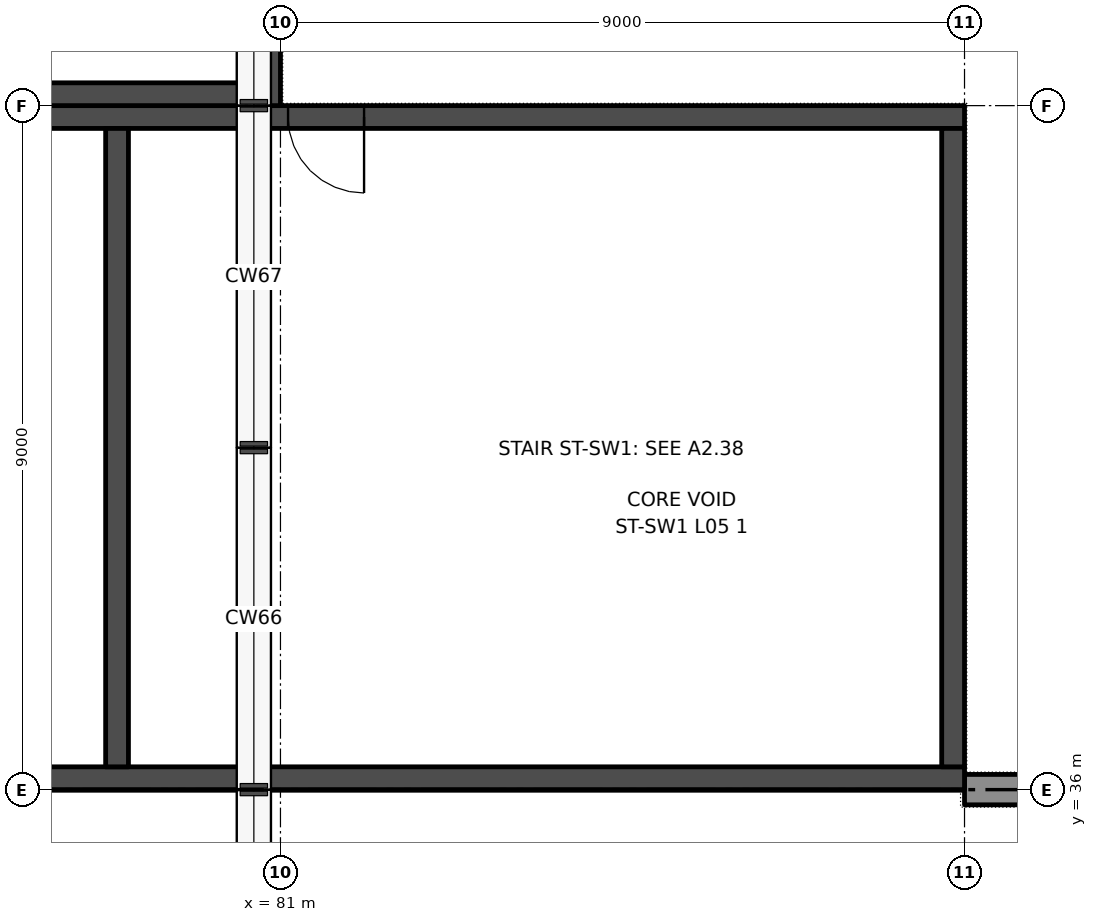
"""IFC4 building model, lengths in metres.
Left out: names, types, materials, properties, quantities, classifications, styles, units other than length and angle.
Written with IfcOpenShell. Run it as: python <this file> out.ifc"""

import sys

from ifc_helpers import new_model, si_unit, direction, frame, frame_2d, origin, place, context, subcontext, project, spatial, rectangle, extrude, element, fill, save


model = new_model("IFC4")
c1 = context("Model", 3, precision=1e-05, world=origin(), true_north=direction((0.0, 1.0)))
c2 = subcontext(c1, "Body", "Model", "MODEL_VIEW")
j1 = project(units=[si_unit("LENGTHUNIT", "METRE"), si_unit("PLANEANGLEUNIT", "RADIAN")], contexts=[c1])
p1 = place(None, origin())
s1 = spatial("IfcSite", under=j1, at=p1, CompositionType="ELEMENT")
p2 = place(p1, origin())
s2 = spatial("IfcBuilding", under=s1, at=p2, CompositionType="ELEMENT")
p3 = place(p2, frame((0.0, 0.0, 33.5)))
s3 = spatial("IfcBuildingStorey", under=s2, at=p3, CompositionType="ELEMENT", Elevation=33.5)
p4 = place(p3, frame((90.0, 36.0, 0.0), z_axis=(0.0, 0.0, 1.0), x_axis=(1.0, 0.0, 0.0)))
e1 = element("IfcWall", 1, at=p4, inside=s3, PredefinedType="SOLIDWALL", context=c2, shape_type="SweptSolid", body=[
    extrude(rectangle(XDim=81.0, YDim=0.4, at=frame_2d((40.5, 0.0))), origin(), (0.0, 0.0, 1.0), 4.0),
])
p5 = place(p4, frame((3.9, 0.0, 0.0)))
e2 = element("IfcOpeningElement", 2, at=p5, cuts=e1, PredefinedType="OPENING", context=c2, shape_type="SweptSolid", body=[
    extrude(rectangle(XDim=1.2, YDim=2.1, at=frame_2d((0.6, 1.05))), frame((0.0, 0.21, 0.0), z_axis=(0.0, -1.0, 0.0), x_axis=(1.0, 0.0, 0.0)), (0.0, 0.0, 1.0), 0.42),
])
p6 = place(p4, frame((75.9, 0.0, 0.0)))
e3 = element("IfcOpeningElement", 3, at=p6, cuts=e1, PredefinedType="OPENING", context=c2, shape_type="SweptSolid", body=[
    extrude(rectangle(XDim=1.2, YDim=2.1, at=frame_2d((0.6, 1.05))), frame((0.0, 0.21, 0.0), z_axis=(0.0, -1.0, 0.0), x_axis=(1.0, 0.0, 0.0)), (0.0, 0.0, 1.0), 0.42),
])
p7 = place(p3, frame((90.0, 44.85, 0.0), z_axis=(0.0, 0.0, 1.0), x_axis=(-1.0, 0.0, 0.0)))
e4 = element("IfcWall", 4, at=p7, inside=s3, PredefinedType="SHEAR", context=c2, shape_type="SweptSolid", body=[
    extrude(rectangle(XDim=18.0, YDim=0.3, at=frame_2d((9.0, 0.0))), origin(), (0.0, 0.0, 1.0), 4.0),
])
p8 = place(p7, frame((7.9, 0.0, 0.0)))
e5 = element("IfcOpeningElement", 5, at=p8, cuts=e4, PredefinedType="OPENING", context=c2, shape_type="SweptSolid", body=[
    extrude(rectangle(XDim=1.0, YDim=2.1, at=frame_2d((0.5, 1.05))), frame((0.0, 0.16, 0.0), z_axis=(0.0, -1.0, 0.0), x_axis=(1.0, 0.0, 0.0)), (0.0, 0.0, 1.0), 0.32),
])
p9 = place(p3, frame((90.0, 36.15, 0.0), z_axis=(0.0, 0.0, 1.0), x_axis=(-1.0, 0.0, 0.0)))
e6 = element("IfcWall", 6, at=p9, inside=s3, PredefinedType="SHEAR", context=c2, shape_type="SweptSolid", body=[
    extrude(rectangle(XDim=18.2, YDim=0.3, at=frame_2d((9.1, 0.0))), origin(), (0.0, 0.0, 1.0), 4.0),
])
for number, where, z_axis, x_axis in (
    (7, (89.85, 44.7, 0.0), (0.0, 0.0, 1.0), (0.0, -1.0, 0.0)),
    (8, (78.85, 44.7, 0.0), (0.0, 0.0, 1.0), (0.0, -1.0, 0.0)),
):
    element("IfcWall", number, at=place(p3, frame(where, z_axis=z_axis, x_axis=x_axis)), inside=s3, PredefinedType="SHEAR", context=c2, shape_type="SweptSolid", body=[
        extrude(rectangle(XDim=8.4, YDim=0.3, at=frame_2d((4.2, 0.0))), origin(), (0.0, 0.0, 1.0), 4.0),
    ])
p10 = place(p3, frame((80.85, 63.0, 0.0), z_axis=(0.0, 0.0, 1.0), x_axis=(0.0, -1.0, 0.0)))
e9 = element("IfcWall", 9, at=p10, inside=s3, PredefinedType="SHEAR", context=c2, shape_type="SweptSolid", body=[
    extrude(rectangle(XDim=18.0, YDim=0.3, at=frame_2d((9.0, 0.0))), origin(), (0.0, 0.0, 1.0), 4.0),
])
p11 = place(p10, frame((8.6, 0.0, 0.0)))
e10 = element("IfcOpeningElement", 10, at=p11, cuts=e9, PredefinedType="OPENING", context=c2, shape_type="SweptSolid", body=[
    extrude(rectangle(XDim=1.2, YDim=2.1, at=frame_2d((0.6, 1.05))), frame((0.0, 0.16, 0.0), z_axis=(0.0, -1.0, 0.0), x_axis=(1.0, 0.0, 0.0)), (0.0, 0.0, 1.0), 0.32),
])
p12 = place(p3, frame((80.7, 45.15, 0.0), z_axis=(0.0, 0.0, 1.0), x_axis=(-1.0, 0.0, 0.0)))
e11 = element("IfcWall", 11, at=p12, inside=s3, PredefinedType="SHEAR", context=c2, shape_type="SweptSolid", body=[
    extrude(rectangle(XDim=8.4, YDim=0.3, at=frame_2d((4.2, 0.0))), origin(), (0.0, 0.0, 1.0), 4.0),
])
p13 = place(p8, origin())
e12 = element("IfcDoor", 12, at=p13, inside=s3, OperationType="SINGLE_SWING_LEFT", PredefinedType="DOOR", context=c2, shape_type="SweptSolid", body=[
    extrude(rectangle(XDim=1.0, YDim=2.1, at=frame_2d((0.5, 1.05))), frame((0.0, 0.025, 0.0), z_axis=(0.0, -1.0, 0.0), x_axis=(1.0, 0.0, 0.0)), (0.0, 0.0, 1.0), 0.05),
])
fill(e5, e12)
save(model, sys.argv[1])
